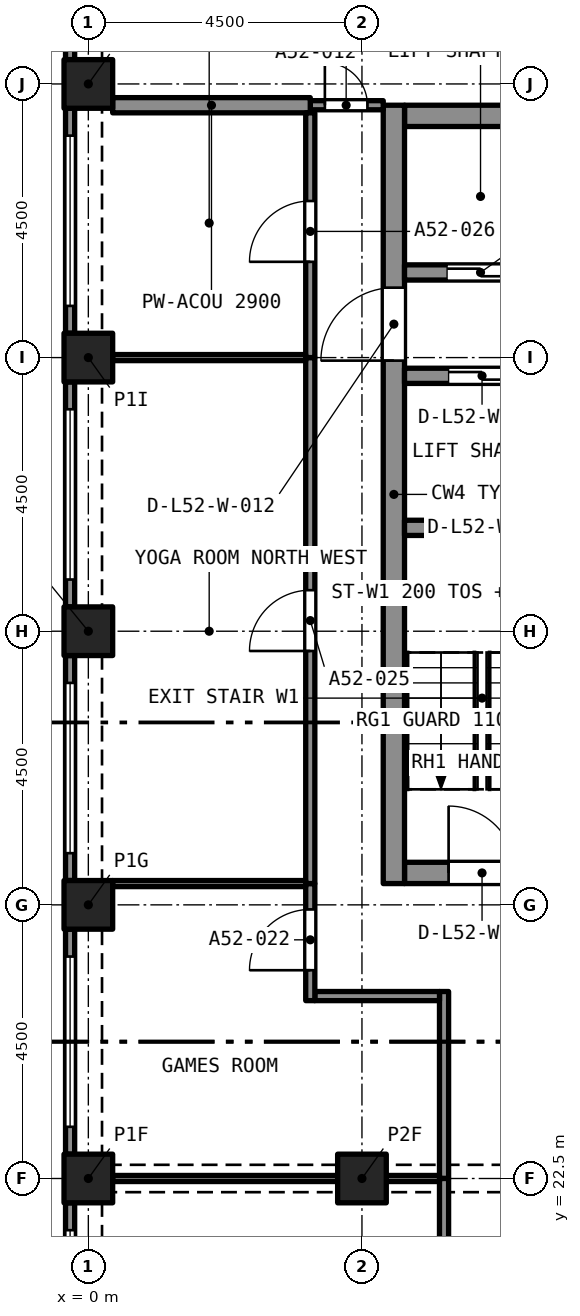
"""IFC4 building model, lengths in metres.
Left out: names, types, materials, properties, quantities, classifications, styles, units other than length and angle.
Written with IfcOpenShell. Run it as: python <this file> out.ifc"""

import sys

from ifc_helpers import new_model, si_unit, direction, frame, frame_2d, origin, origin_2d, place, context, subcontext, project, spatial, rectangle, extrude, element, fill, save


model = new_model("IFC4")
c1 = context("Model", 3, precision=1e-05, world=origin(), true_north=direction((0.0, 1.0)))
c2 = subcontext(c1, "Body", "Model", "MODEL_VIEW")
j1 = project(units=[si_unit("LENGTHUNIT", "METRE"), si_unit("PLANEANGLEUNIT", "RADIAN")], contexts=[c1])
p1 = place(None, origin())
s1 = spatial("IfcSite", under=j1, at=p1, CompositionType="ELEMENT")
p2 = place(p1, origin())
s2 = spatial("IfcBuilding", under=s1, at=p2, CompositionType="ELEMENT")
p3 = place(p2, frame((0.0, 0.0, 189.1)))
s3 = spatial("IfcBuildingStorey", under=s2, at=p3, CompositionType="ELEMENT", Elevation=189.1)
for number, where, z_axis, x_axis in (
    (1, (0.0, 22.5, 0.0), (0.0, 0.0, 1.0), (1.0, 0.0, 0.0)),
    (2, (4.5, 22.5, 0.0), (0.0, 0.0, 1.0), (1.0, 0.0, 0.0)),
    (3, (0.0, 27.0, 0.0), (0.0, 0.0, 1.0), (1.0, 0.0, 0.0)),
    (4, (0.0, 31.5, 0.0), (0.0, 0.0, 1.0), (1.0, 0.0, 0.0)),
    (5, (0.0, 36.0, 0.0), (0.0, 0.0, 1.0), (1.0, 0.0, 0.0)),
    (6, (0.0, 40.5, 0.0), (0.0, 0.0, 1.0), (1.0, 0.0, 0.0)),
):
    element("IfcColumn", number, at=place(p3, frame(where, z_axis=z_axis, x_axis=x_axis)), inside=s3, PredefinedType="COLUMN", context=c2, shape_type="SweptSolid", body=[
        extrude(rectangle(XDim=0.8, YDim=0.8, at=origin_2d()), origin(), (0.0, 0.0, 1.0), 3.2),
    ])
p4 = place(p3, frame((5.2, 27.525, 0.0), z_axis=(0.0, 0.0, 1.0), x_axis=(1.0, 0.0, 0.0)))
e7 = element("IfcWall", 7, at=p4, inside=s3, PredefinedType="SOLIDWALL", context=c2, shape_type="SweptSolid", body=[
    extrude(rectangle(XDim=7.6, YDim=0.35, at=frame_2d((3.8, 0.0))), origin(), (0.0, 0.0, 1.0), 3.2),
])
p5 = place(p4, frame((0.725, 0.0, 0.0)))
e8 = element("IfcOpeningElement", 8, at=p5, cuts=e7, PredefinedType="OPENING", context=c2, shape_type="SweptSolid", body=[
    extrude(rectangle(XDim=1.1, YDim=2.1, at=frame_2d((0.55, 1.05))), frame((0.0, 0.185, 0.0), z_axis=(0.0, -1.0, 0.0), x_axis=(1.0, 0.0, 0.0)), (0.0, 0.0, 1.0), 0.37),
])
p6 = place(p4, frame((3.25, 0.0, 0.0)))
e9 = element("IfcOpeningElement", 9, at=p6, cuts=e7, PredefinedType="OPENING", context=c2, shape_type="SweptSolid", body=[
    extrude(rectangle(XDim=1.1, YDim=2.1, at=frame_2d((0.55, 1.05))), frame((0.0, 0.185, 0.0), z_axis=(0.0, -1.0, 0.0), x_axis=(1.0, 0.0, 0.0)), (0.0, 0.0, 1.0), 0.37),
])
p7 = place(p4, frame((5.775, 0.0, 0.0)))
e10 = element("IfcOpeningElement", 10, at=p7, cuts=e7, PredefinedType="OPENING", context=c2, shape_type="SweptSolid", body=[
    extrude(rectangle(XDim=1.1, YDim=2.1, at=frame_2d((0.55, 1.05))), frame((0.0, 0.185, 0.0), z_axis=(0.0, -1.0, 0.0), x_axis=(1.0, 0.0, 0.0)), (0.0, 0.0, 1.0), 0.37),
])
p8 = place(p3, frame((5.2, 39.975, 0.0), z_axis=(0.0, 0.0, 1.0), x_axis=(1.0, 0.0, 0.0)))
e11 = element("IfcWall", 11, at=p8, inside=s3, PredefinedType="SOLIDWALL", context=c2, shape_type="SweptSolid", body=[
    extrude(rectangle(XDim=7.6, YDim=0.35, at=frame_2d((3.8, 0.0))), origin(), (0.0, 0.0, 1.0), 3.2),
])
p9 = place(p3, frame((5.025, 27.35, 0.0), z_axis=(0.0, 0.0, 1.0), x_axis=(0.0, 1.0, 0.0)))
e12 = element("IfcWall", 12, at=p9, inside=s3, PredefinedType="SOLIDWALL", context=c2, shape_type="SweptSolid", body=[
    extrude(rectangle(XDim=12.8, YDim=0.35, at=frame_2d((6.4, 0.0))), origin(), (0.0, 0.0, 1.0), 3.2),
])
p10 = place(p9, frame((8.6, 0.0, 0.0)))
e13 = element("IfcOpeningElement", 13, at=p10, cuts=e12, PredefinedType="OPENING", context=c2, shape_type="SweptSolid", body=[
    extrude(rectangle(XDim=1.2, YDim=2.1, at=frame_2d((0.6, 1.05))), frame((0.0, 0.185, 0.0), z_axis=(0.0, -1.0, 0.0), x_axis=(1.0, 0.0, 0.0)), (0.0, 0.0, 1.0), 0.37),
])
p11 = place(p3, frame((-0.3, 40.9, 0.0), z_axis=(0.0, 0.0, 1.0), x_axis=(0.0, 1.0, 0.0)))
e14 = element("IfcWall", 14, at=p11, inside=s3, PredefinedType="SOLIDWALL", context=c2, shape_type="SweptSolid", body=[
    extrude(rectangle(XDim=3.7, YDim=0.15, at=frame_2d((1.85, 0.0))), origin(), (0.0, 0.0, 1.0), 3.2),
])
p12 = place(p11, frame((0.45, 0.0, 0.45)))
e15 = element("IfcOpeningElement", 15, at=p12, cuts=e14, PredefinedType="OPENING", context=c2, shape_type="SweptSolid", body=[
    extrude(rectangle(XDim=2.8, YDim=1.95, at=frame_2d((1.4, 0.975))), frame((0.0, 0.085, 0.0), z_axis=(0.0, -1.0, 0.0), x_axis=(1.0, 0.0, 0.0)), (0.0, 0.0, 1.0), 0.17),
])
p13 = place(p3, frame((-0.3, 36.4, 0.0), z_axis=(0.0, 0.0, 1.0), x_axis=(0.0, 1.0, 0.0)))
e16 = element("IfcWall", 16, at=p13, inside=s3, PredefinedType="SOLIDWALL", context=c2, shape_type="SweptSolid", body=[
    extrude(rectangle(XDim=3.7, YDim=0.15, at=frame_2d((1.85, 0.0))), origin(), (0.0, 0.0, 1.0), 3.2),
])
p14 = place(p13, frame((0.45, 0.0, 0.45)))
e17 = element("IfcOpeningElement", 17, at=p14, cuts=e16, PredefinedType="OPENING", context=c2, shape_type="SweptSolid", body=[
    extrude(rectangle(XDim=2.8, YDim=1.95, at=frame_2d((1.4, 0.975))), frame((0.0, 0.085, 0.0), z_axis=(0.0, -1.0, 0.0), x_axis=(1.0, 0.0, 0.0)), (0.0, 0.0, 1.0), 0.17),
])
p15 = place(p3, frame((-0.3, 31.9, 0.0), z_axis=(0.0, 0.0, 1.0), x_axis=(0.0, 1.0, 0.0)))
e18 = element("IfcWall", 18, at=p15, inside=s3, PredefinedType="SOLIDWALL", context=c2, shape_type="SweptSolid", body=[
    extrude(rectangle(XDim=3.7, YDim=0.15, at=frame_2d((1.85, 0.0))), origin(), (0.0, 0.0, 1.0), 3.2),
])
p16 = place(p15, frame((0.45, 0.0, 0.45)))
e19 = element("IfcOpeningElement", 19, at=p16, cuts=e18, PredefinedType="OPENING", context=c2, shape_type="SweptSolid", body=[
    extrude(rectangle(XDim=2.8, YDim=1.95, at=frame_2d((1.4, 0.975))), frame((0.0, 0.085, 0.0), z_axis=(0.0, -1.0, 0.0), x_axis=(1.0, 0.0, 0.0)), (0.0, 0.0, 1.0), 0.17),
])
p17 = place(p3, frame((-0.3, 27.4, 0.0), z_axis=(0.0, 0.0, 1.0), x_axis=(0.0, 1.0, 0.0)))
e20 = element("IfcWall", 20, at=p17, inside=s3, PredefinedType="SOLIDWALL", context=c2, shape_type="SweptSolid", body=[
    extrude(rectangle(XDim=3.7, YDim=0.15, at=frame_2d((1.85, 0.0))), origin(), (0.0, 0.0, 1.0), 3.2),
])
p18 = place(p17, frame((0.45, 0.0, 0.45)))
e21 = element("IfcOpeningElement", 21, at=p18, cuts=e20, PredefinedType="OPENING", context=c2, shape_type="SweptSolid", body=[
    extrude(rectangle(XDim=2.8, YDim=1.95, at=frame_2d((1.4, 0.975))), frame((0.0, 0.085, 0.0), z_axis=(0.0, -1.0, 0.0), x_axis=(1.0, 0.0, 0.0)), (0.0, 0.0, 1.0), 0.17),
])
p19 = place(p3, frame((-0.3, 22.9, 0.0), z_axis=(0.0, 0.0, 1.0), x_axis=(0.0, 1.0, 0.0)))
e22 = element("IfcWall", 22, at=p19, inside=s3, PredefinedType="SOLIDWALL", context=c2, shape_type="SweptSolid", body=[
    extrude(rectangle(XDim=3.7, YDim=0.15, at=frame_2d((1.85, 0.0))), origin(), (0.0, 0.0, 1.0), 3.2),
])
p20 = place(p19, frame((0.45, 0.0, 0.45)))
e23 = element("IfcOpeningElement", 23, at=p20, cuts=e22, PredefinedType="OPENING", context=c2, shape_type="SweptSolid", body=[
    extrude(rectangle(XDim=2.8, YDim=1.95, at=frame_2d((1.4, 0.975))), frame((0.0, 0.085, 0.0), z_axis=(0.0, -1.0, 0.0), x_axis=(1.0, 0.0, 0.0)), (0.0, 0.0, 1.0), 0.17),
])
p21 = place(p3, frame((-0.3, 18.4, 0.0), z_axis=(0.0, 0.0, 1.0), x_axis=(0.0, 1.0, 0.0)))
e24 = element("IfcWall", 24, at=p21, inside=s3, PredefinedType="SOLIDWALL", context=c2, shape_type="SweptSolid", body=[
    extrude(rectangle(XDim=3.7, YDim=0.15, at=frame_2d((1.85, 0.0))), origin(), (0.0, 0.0, 1.0), 3.2),
])
p22 = place(p21, frame((0.45, 0.0, 0.45)))
e25 = element("IfcOpeningElement", 25, at=p22, cuts=e24, PredefinedType="OPENING", context=c2, shape_type="SweptSolid", body=[
    extrude(rectangle(XDim=2.8, YDim=1.95, at=frame_2d((1.4, 0.975))), frame((0.0, 0.085, 0.0), z_axis=(0.0, -1.0, 0.0), x_axis=(1.0, 0.0, 0.0)), (0.0, 0.0, 1.0), 0.17),
])
p23 = place(p3, frame((3.65, 40.15, 0.0), z_axis=(0.0, 0.0, 1.0), x_axis=(1.0, 0.0, 0.0)))
e26 = element("IfcWall", 26, at=p23, inside=s3, PredefinedType="PARTITIONING", context=c2, shape_type="SweptSolid", body=[
    extrude(rectangle(XDim=1.2, YDim=0.15, at=frame_2d((0.6, 0.0))), origin(), (0.0, 0.0, 1.0), 2.9),
])
p24 = place(p23, frame((0.24, 0.0, 0.0)))
e27 = element("IfcOpeningElement", 27, at=p24, cuts=e26, PredefinedType="OPENING", context=c2, shape_type="SweptSolid", body=[
    extrude(rectangle(XDim=0.7, YDim=2.1, at=frame_2d((0.35, 1.05))), frame((0.0, 0.085, 0.0), z_axis=(0.0, -1.0, 0.0), x_axis=(1.0, 0.0, 0.0)), (0.0, 0.0, 1.0), 0.17),
])
p25 = place(p3, frame((0.4, 40.15, 0.0), z_axis=(0.0, 0.0, 1.0), x_axis=(1.0, 0.0, 0.0)))
e28 = element("IfcWall", 28, at=p25, inside=s3, PredefinedType="PARTITIONING", context=c2, shape_type="SweptSolid", body=[
    extrude(rectangle(XDim=3.25, YDim=0.25, at=frame_2d((1.625, 0.0))), origin(), (0.0, 0.0, 1.0), 2.9),
])
p26 = place(p3, frame((5.85, 22.5, 0.0), z_axis=(0.0, 0.0, 1.0), x_axis=(0.0, 1.0, 0.0)))
e29 = element("IfcWall", 29, at=p26, inside=s3, PredefinedType="PARTITIONING", context=c2, shape_type="SweptSolid", body=[
    extrude(rectangle(XDim=3.075, YDim=0.15, at=frame_2d((1.538, 0.0))), origin(), (0.0, 0.0, 1.0), 2.9),
])
p27 = place(p3, frame((3.725, 25.5, 0.0), z_axis=(0.0, 0.0, 1.0), x_axis=(1.0, 0.0, 0.0)))
e30 = element("IfcWall", 30, at=p27, inside=s3, PredefinedType="PARTITIONING", context=c2, shape_type="SweptSolid", body=[
    extrude(rectangle(XDim=2.05, YDim=0.15, at=frame_2d((1.025, 0.0))), origin(), (0.0, 0.0, 1.0), 2.9),
])
p28 = place(p3, frame((3.65, 25.425, 0.0), z_axis=(0.0, 0.0, 1.0), x_axis=(0.0, 1.0, 0.0)))
e31 = element("IfcWall", 31, at=p28, inside=s3, PredefinedType="PARTITIONING", context=c2, shape_type="SweptSolid", body=[
    extrude(rectangle(XDim=1.925, YDim=0.15, at=frame_2d((0.962, 0.0))), origin(), (0.0, 0.0, 1.0), 2.9),
])
p29 = place(p28, frame((0.5, 0.0, 0.0)))
e32 = element("IfcOpeningElement", 32, at=p29, cuts=e31, PredefinedType="OPENING", context=c2, shape_type="SweptSolid", body=[
    extrude(rectangle(XDim=1.0, YDim=2.1, at=frame_2d((0.5, 1.05))), frame((0.0, 0.085, 0.0), z_axis=(0.0, -1.0, 0.0), x_axis=(1.0, 0.0, 0.0)), (0.0, 0.0, 1.0), 0.17),
])
p30 = place(p3, frame((3.65, 27.35, 0.0), z_axis=(0.0, 0.0, 1.0), x_axis=(0.0, 1.0, 0.0)))
e33 = element("IfcWall", 33, at=p30, inside=s3, PredefinedType="PARTITIONING", context=c2, shape_type="SweptSolid", body=[
    extrude(rectangle(XDim=8.65, YDim=0.15, at=frame_2d((4.325, 0.0))), origin(), (0.0, 0.0, 1.0), 2.9),
])
p31 = place(p30, frame((3.825, 0.0, 0.0)))
e34 = element("IfcOpeningElement", 34, at=p31, cuts=e33, PredefinedType="OPENING", context=c2, shape_type="SweptSolid", body=[
    extrude(rectangle(XDim=1.0, YDim=2.1, at=frame_2d((0.5, 1.05))), frame((0.0, 0.085, 0.0), z_axis=(0.0, -1.0, 0.0), x_axis=(1.0, 0.0, 0.0)), (0.0, 0.0, 1.0), 0.17),
])
p32 = place(p3, frame((3.65, 36.0, 0.0), z_axis=(0.0, 0.0, 1.0), x_axis=(0.0, 1.0, 0.0)))
e35 = element("IfcWall", 35, at=p32, inside=s3, PredefinedType="PARTITIONING", context=c2, shape_type="SweptSolid", body=[
    extrude(rectangle(XDim=4.025, YDim=0.15, at=frame_2d((2.012, 0.0))), origin(), (0.0, 0.0, 1.0), 2.9),
])
p33 = place(p32, frame((1.575, 0.0, 0.0)))
e36 = element("IfcOpeningElement", 36, at=p33, cuts=e35, PredefinedType="OPENING", context=c2, shape_type="SweptSolid", body=[
    extrude(rectangle(XDim=1.0, YDim=2.1, at=frame_2d((0.5, 1.05))), frame((0.0, 0.085, 0.0), z_axis=(0.0, -1.0, 0.0), x_axis=(1.0, 0.0, 0.0)), (0.0, 0.0, 1.0), 0.17),
])
p34 = place(p3, frame((5.85, 13.025, 0.0), z_axis=(0.0, 0.0, 1.0), x_axis=(0.0, 1.0, 0.0)))
e37 = element("IfcWall", 37, at=p34, inside=s3, PredefinedType="PARTITIONING", context=c2, shape_type="SweptSolid", body=[
    extrude(rectangle(XDim=9.475, YDim=0.15, at=frame_2d((4.738, 0.0))), origin(), (0.0, 0.0, 1.0), 2.9),
])
p35 = place(p34, frame((4.275, 0.0, 0.0)))
e38 = element("IfcOpeningElement", 38, at=p35, cuts=e37, PredefinedType="OPENING", context=c2, shape_type="SweptSolid", body=[
    extrude(rectangle(XDim=1.0, YDim=2.1, at=frame_2d((0.5, 1.05))), frame((0.0, 0.085, 0.0), z_axis=(0.0, -1.0, 0.0), x_axis=(1.0, 0.0, 0.0)), (0.0, 0.0, 1.0), 0.17),
])
p36 = place(p3, frame((0.4, 27.35, 0.0), z_axis=(0.0, 0.0, 1.0), x_axis=(1.0, 0.0, 0.0)))
e39 = element("IfcWall", 39, at=p36, inside=s3, PredefinedType="PARTITIONING", context=c2, shape_type="SweptSolid", body=[
    extrude(rectangle(XDim=3.175, YDim=0.1, at=frame_2d((1.587, 0.0))), origin(), (0.0, 0.0, 1.0), 2.9),
])
p37 = place(p3, frame((4.9, 22.5, 0.0), z_axis=(0.0, 0.0, 1.0), x_axis=(1.0, 0.0, 0.0)))
e40 = element("IfcWall", 40, at=p37, inside=s3, PredefinedType="PARTITIONING", context=c2, shape_type="SweptSolid", body=[
    extrude(rectangle(XDim=0.875, YDim=0.1, at=frame_2d((0.438, 0.0))), origin(), (0.0, 0.0, 1.0), 2.38),
])
p38 = place(p3, frame((0.4, 22.5, 0.0), z_axis=(0.0, 0.0, 1.0), x_axis=(1.0, 0.0, 0.0)))
e41 = element("IfcWall", 41, at=p38, inside=s3, PredefinedType="PARTITIONING", context=c2, shape_type="SweptSolid", body=[
    extrude(rectangle(XDim=3.7, YDim=0.1, at=frame_2d((1.85, 0.0))), origin(), (0.0, 0.0, 1.0), 2.38),
])
p39 = place(p3, frame((0.4, 36.0, 0.0), z_axis=(0.0, 0.0, 1.0), x_axis=(1.0, 0.0, 0.0)))
e42 = element("IfcWall", 42, at=p39, inside=s3, PredefinedType="PARTITIONING", context=c2, shape_type="SweptSolid", body=[
    extrude(rectangle(XDim=3.175, YDim=0.1, at=frame_2d((1.587, 0.0))), origin(), (0.0, 0.0, 1.0), 2.9),
])
p40 = place(p3, frame((5.2, 33.2, 0.0), z_axis=(0.0, 0.0, 1.0), x_axis=(1.0, 0.0, 0.0)))
e43 = element("IfcWall", 43, at=p40, inside=s3, PredefinedType="SOLIDWALL", context=c2, shape_type="SweptSolid", body=[
    extrude(rectangle(XDim=7.6, YDim=0.25, at=frame_2d((3.8, 0.0))), origin(), (0.0, 0.0, 1.0), 2.9),
])
p41 = place(p40, frame((3.3, 0.0, 0.0)))
e44 = element("IfcOpeningElement", 44, at=p41, cuts=e43, PredefinedType="OPENING", context=c2, shape_type="SweptSolid", body=[
    extrude(rectangle(XDim=1.0, YDim=2.1, at=frame_2d((0.5, 1.05))), frame((0.0, 0.135, 0.0), z_axis=(0.0, -1.0, 0.0), x_axis=(1.0, 0.0, 0.0)), (0.0, 0.0, 1.0), 0.27),
])
p42 = place(p3, frame((5.2, 35.7, 0.0), z_axis=(0.0, 0.0, 1.0), x_axis=(1.0, 0.0, 0.0)))
e45 = element("IfcWall", 45, at=p42, inside=s3, PredefinedType="SOLIDWALL", context=c2, shape_type="SweptSolid", body=[
    extrude(rectangle(XDim=7.6, YDim=0.25, at=frame_2d((3.8, 0.0))), origin(), (0.0, 0.0, 1.0), 2.9),
])
p43 = place(p42, frame((0.725, 0.0, 0.0)))
e46 = element("IfcOpeningElement", 46, at=p43, cuts=e45, PredefinedType="OPENING", context=c2, shape_type="SweptSolid", body=[
    extrude(rectangle(XDim=1.1, YDim=2.4, at=frame_2d((0.55, 1.2))), frame((0.0, 0.135, 0.0), z_axis=(0.0, -1.0, 0.0), x_axis=(1.0, 0.0, 0.0)), (0.0, 0.0, 1.0), 0.27),
])
p44 = place(p42, frame((5.875, 0.0, 0.0)))
e47 = element("IfcOpeningElement", 47, at=p44, cuts=e45, PredefinedType="OPENING", context=c2, shape_type="SweptSolid", body=[
    extrude(rectangle(XDim=0.9, YDim=2.1, at=frame_2d((0.45, 1.05))), frame((0.0, 0.135, 0.0), z_axis=(0.0, -1.0, 0.0), x_axis=(1.0, 0.0, 0.0)), (0.0, 0.0, 1.0), 0.27),
])
p45 = place(p3, frame((5.2, 37.4, 0.0), z_axis=(0.0, 0.0, 1.0), x_axis=(1.0, 0.0, 0.0)))
e48 = element("IfcWall", 48, at=p45, inside=s3, PredefinedType="SOLIDWALL", context=c2, shape_type="SweptSolid", body=[
    extrude(rectangle(XDim=7.6, YDim=0.25, at=frame_2d((3.8, 0.0))), origin(), (0.0, 0.0, 1.0), 2.9),
])
p46 = place(p45, frame((0.7, 0.0, 0.0)))
e49 = element("IfcOpeningElement", 49, at=p46, cuts=e48, PredefinedType="OPENING", context=c2, shape_type="SweptSolid", body=[
    extrude(rectangle(XDim=1.1, YDim=2.4, at=frame_2d((0.55, 1.2))), frame((0.0, 0.135, 0.0), z_axis=(0.0, -1.0, 0.0), x_axis=(1.0, 0.0, 0.0)), (0.0, 0.0, 1.0), 0.27),
])
p47 = place(p14, origin())
e50 = element("IfcWindow", 50, at=p47, inside=s3, PartitioningType="SINGLE_PANEL", PredefinedType="WINDOW", context=c2, shape_type="SweptSolid", body=[
    extrude(rectangle(XDim=2.8, YDim=1.95, at=frame_2d((1.4, 0.975))), frame((0.0, 0.03, 0.0), z_axis=(0.0, -1.0, 0.0), x_axis=(1.0, 0.0, 0.0)), (0.0, 0.0, 1.0), 0.06),
])
fill(e17, e50)
p48 = place(p16, origin())
e51 = element("IfcWindow", 51, at=p48, inside=s3, PartitioningType="SINGLE_PANEL", PredefinedType="WINDOW", context=c2, shape_type="SweptSolid", body=[
    extrude(rectangle(XDim=2.8, YDim=1.95, at=frame_2d((1.4, 0.975))), frame((0.0, 0.03, 0.0), z_axis=(0.0, -1.0, 0.0), x_axis=(1.0, 0.0, 0.0)), (0.0, 0.0, 1.0), 0.06),
])
fill(e19, e51)
p49 = place(p18, origin())
e52 = element("IfcWindow", 52, at=p49, inside=s3, PartitioningType="SINGLE_PANEL", PredefinedType="WINDOW", context=c2, shape_type="SweptSolid", body=[
    extrude(rectangle(XDim=2.8, YDim=1.95, at=frame_2d((1.4, 0.975))), frame((0.0, 0.03, 0.0), z_axis=(0.0, -1.0, 0.0), x_axis=(1.0, 0.0, 0.0)), (0.0, 0.0, 1.0), 0.06),
])
fill(e21, e52)
p50 = place(p20, origin())
e53 = element("IfcWindow", 53, at=p50, inside=s3, PartitioningType="SINGLE_PANEL", PredefinedType="WINDOW", context=c2, shape_type="SweptSolid", body=[
    extrude(rectangle(XDim=2.8, YDim=1.95, at=frame_2d((1.4, 0.975))), frame((0.0, 0.03, 0.0), z_axis=(0.0, -1.0, 0.0), x_axis=(1.0, 0.0, 0.0)), (0.0, 0.0, 1.0), 0.06),
])
fill(e23, e53)
p51 = place(p22, origin())
e54 = element("IfcWindow", 54, at=p51, inside=s3, PartitioningType="SINGLE_PANEL", PredefinedType="WINDOW", context=c2, shape_type="SweptSolid", body=[
    extrude(rectangle(XDim=2.8, YDim=1.95, at=frame_2d((1.4, 0.975))), frame((0.0, 0.03, 0.0), z_axis=(0.0, -1.0, 0.0), x_axis=(1.0, 0.0, 0.0)), (0.0, 0.0, 1.0), 0.06),
])
fill(e25, e54)
p52 = place(p24, origin())
e55 = element("IfcDoor", 55, at=p52, inside=s3, OperationType="SINGLE_SWING_LEFT", PredefinedType="DOOR", context=c2, shape_type="SweptSolid", body=[
    extrude(rectangle(XDim=0.7, YDim=2.1, at=frame_2d((0.35, 1.05))), frame((0.0, 0.025, 0.0), z_axis=(0.0, -1.0, 0.0), x_axis=(1.0, 0.0, 0.0)), (0.0, 0.0, 1.0), 0.05),
])
fill(e27, e55)
p53 = place(p29, origin())
e56 = element("IfcDoor", 56, at=p53, inside=s3, OperationType="SINGLE_SWING_RIGHT", PredefinedType="DOOR", context=c2, shape_type="SweptSolid", body=[
    extrude(rectangle(XDim=1.0, YDim=2.1, at=frame_2d((0.5, 1.05))), frame((0.0, 0.025, 0.0), z_axis=(0.0, -1.0, 0.0), x_axis=(1.0, 0.0, 0.0)), (0.0, 0.0, 1.0), 0.05),
])
fill(e32, e56)
p54 = place(p31, origin())
e57 = element("IfcDoor", 57, at=p54, inside=s3, OperationType="SINGLE_SWING_RIGHT", PredefinedType="DOOR", context=c2, shape_type="SweptSolid", body=[
    extrude(rectangle(XDim=1.0, YDim=2.1, at=frame_2d((0.5, 1.05))), frame((0.0, 0.025, 0.0), z_axis=(0.0, -1.0, 0.0), x_axis=(1.0, 0.0, 0.0)), (0.0, 0.0, 1.0), 0.05),
])
fill(e34, e57)
p55 = place(p33, origin())
e58 = element("IfcDoor", 58, at=p55, inside=s3, OperationType="SINGLE_SWING_RIGHT", PredefinedType="DOOR", context=c2, shape_type="SweptSolid", body=[
    extrude(rectangle(XDim=1.0, YDim=2.1, at=frame_2d((0.5, 1.05))), frame((0.0, 0.025, 0.0), z_axis=(0.0, -1.0, 0.0), x_axis=(1.0, 0.0, 0.0)), (0.0, 0.0, 1.0), 0.05),
])
fill(e36, e58)
p56 = place(p46, origin())
e59 = element("IfcDoor", 59, at=p56, inside=s3, OperationType="SLIDING_TO_LEFT", PredefinedType="DOOR", context=c2, shape_type="SweptSolid", body=[
    extrude(rectangle(XDim=1.1, YDim=2.4, at=frame_2d((0.55, 1.2))), frame((0.0, 0.025, 0.0), z_axis=(0.0, -1.0, 0.0), x_axis=(1.0, 0.0, 0.0)), (0.0, 0.0, 1.0), 0.05),
])
fill(e49, e59)
p57 = place(p43, origin())
e60 = element("IfcDoor", 60, at=p57, inside=s3, OperationType="SLIDING_TO_LEFT", PredefinedType="DOOR", context=c2, shape_type="SweptSolid", body=[
    extrude(rectangle(XDim=1.1, YDim=2.4, at=frame_2d((0.55, 1.2))), frame((0.0, 0.025, 0.0), z_axis=(0.0, -1.0, 0.0), x_axis=(1.0, 0.0, 0.0)), (0.0, 0.0, 1.0), 0.05),
])
fill(e46, e60)
p58 = place(p5, origin())
e61 = element("IfcDoor", 61, at=p58, inside=s3, OperationType="SINGLE_SWING_LEFT", PredefinedType="DOOR", context=c2, shape_type="SweptSolid", body=[
    extrude(rectangle(XDim=1.1, YDim=2.1, at=frame_2d((0.55, 1.05))), frame((0.0, 0.025, 0.0), z_axis=(0.0, -1.0, 0.0), x_axis=(1.0, 0.0, 0.0)), (0.0, 0.0, 1.0), 0.05),
])
fill(e8, e61)
p59 = place(p10, origin())
e62 = element("IfcDoor", 62, at=p59, inside=s3, OperationType="SINGLE_SWING_LEFT", PredefinedType="DOOR", context=c2, shape_type="SweptSolid", body=[
    extrude(rectangle(XDim=1.2, YDim=2.1, at=frame_2d((0.6, 1.05))), frame((0.0, 0.025, 0.0), z_axis=(0.0, -1.0, 0.0), x_axis=(1.0, 0.0, 0.0)), (0.0, 0.0, 1.0), 0.05),
])
fill(e13, e62)
save(model, sys.argv[1])
